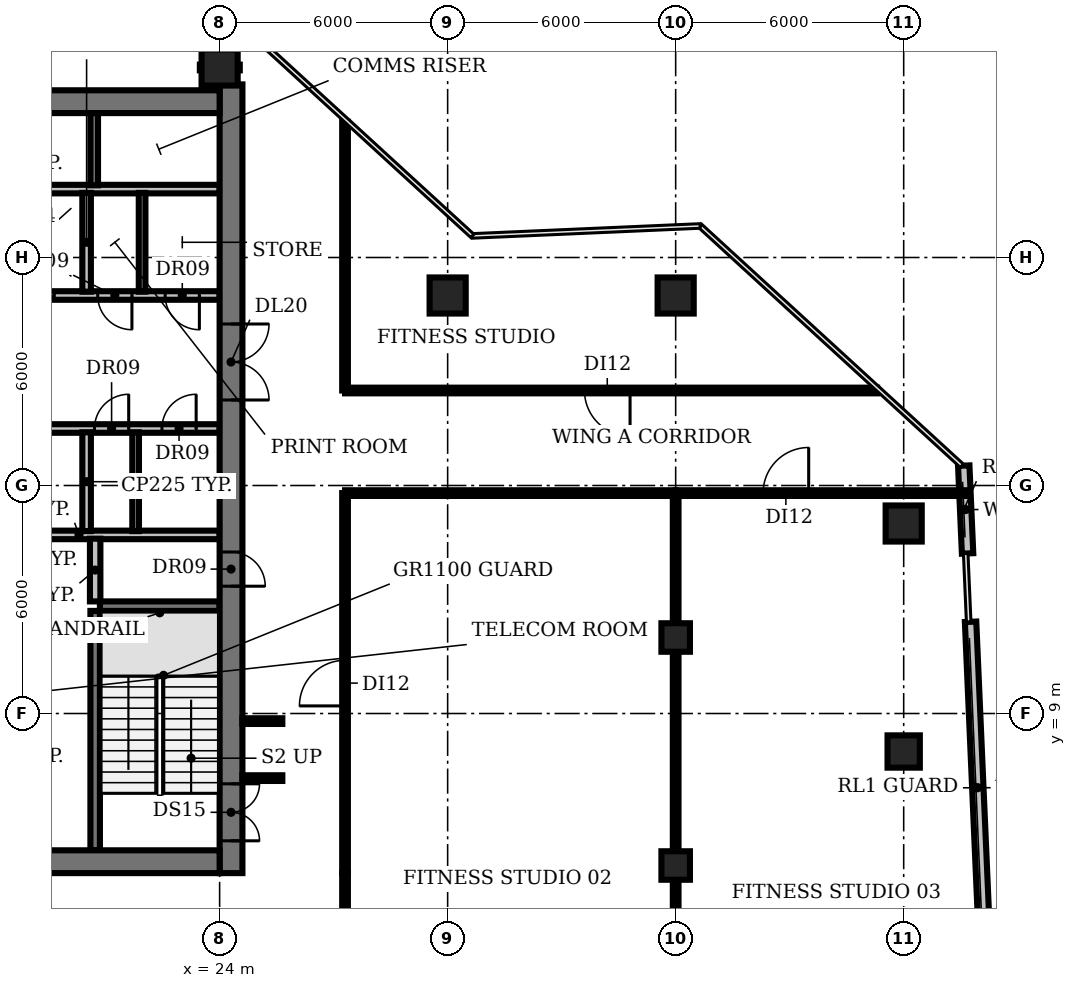
"""IFC4 building model, lengths in metres.
Left out: names, types, materials, properties, quantities, classifications, styles, units other than length and angle.
Written with IfcOpenShell. Run it as: python <this file> out.ifc"""

import sys

from ifc_helpers import new_model, si_unit, direction, frame, frame_2d, origin, origin_2d, place, context, subcontext, project, spatial, rectangle, circle, extrude, element, fill, save


model = new_model("IFC4")
c1 = context("Model", 3, precision=1e-05, world=origin(), true_north=direction((0.0, 1.0)))
c2 = subcontext(c1, "Body", "Model", "MODEL_VIEW")
j1 = project(units=[si_unit("LENGTHUNIT", "METRE"), si_unit("PLANEANGLEUNIT", "RADIAN")], contexts=[c1])
p1 = place(None, origin())
s1 = spatial("IfcSite", under=j1, at=p1, CompositionType="ELEMENT")
p2 = place(p1, origin())
s2 = spatial("IfcBuilding", under=s1, at=p2, CompositionType="ELEMENT")
p3 = place(p2, frame((0.0, 0.0, 180.2)))
s3 = spatial("IfcBuildingStorey", under=s2, at=p3, CompositionType="ELEMENT", Elevation=180.2)
for number, where, z_axis, x_axis in (
    (1, (24.0, 26.0, 0.0), (0.0, 0.0, 1.0), (1.0, 0.0, 0.0)),
    (2, (30.0, 20.0, 0.0), (0.0, 0.0, 1.0), (1.0, 0.0, 0.0)),
):
    element("IfcColumn", number, at=place(p3, frame(where, z_axis=z_axis, x_axis=x_axis)), inside=s3, PredefinedType="COLUMN", context=c2, shape_type="SweptSolid", body=[
        extrude(circle(Radius=0.475, at=origin_2d()), origin(), (0.0, 0.0, 1.0), 3.85),
    ])
for number, where, z_axis, x_axis in (
    (3, (36.0, 5.0, 0.0), (0.0, 0.0, 1.0), (1.0, 0.0, 0.0)),
    (4, (36.0, 11.0, 0.0), (0.0, 0.0, 1.0), (1.0, 0.0, 0.0)),
):
    element("IfcColumn", number, at=place(p3, frame(where, z_axis=z_axis, x_axis=x_axis)), inside=s3, PredefinedType="COLUMN", context=c2, shape_type="SweptSolid", body=[
        extrude(rectangle(XDim=0.75, YDim=0.75, at=origin_2d()), origin(), (0.0, 0.0, 1.0), 3.85),
    ])
p4 = place(p3, frame((36.0, 20.0, 0.0), z_axis=(0.0, 0.0, 1.0), x_axis=(1.0, 0.0, 0.0)))
e5 = element("IfcColumn", 5, at=p4, inside=s3, PredefinedType="COLUMN", context=c2, shape_type="SweptSolid", body=[
    extrude(circle(Radius=0.475, at=origin_2d()), origin(), (0.0, 0.0, 1.0), 3.85),
])
p5 = place(p3, frame((42.0, 8.0, 0.0), z_axis=(0.0, 0.0, 1.0), x_axis=(1.0, 0.0, 0.0)))
e6 = element("IfcColumn", 6, at=p5, inside=s3, PredefinedType="COLUMN", context=c2, shape_type="SweptSolid", body=[
    extrude(rectangle(XDim=0.85, YDim=0.85, at=origin_2d()), origin(), (0.0, 0.0, 1.0), 3.85),
])
p6 = place(p3, frame((42.0, 14.0, 0.0), z_axis=(0.0, 0.0, 1.0), x_axis=(1.0, 0.0, 0.0)))
e7 = element("IfcColumn", 7, at=p6, inside=s3, PredefinedType="COLUMN", context=c2, shape_type="SweptSolid", body=[
    extrude(circle(Radius=0.475, at=origin_2d()), origin(), (0.0, 0.0, 1.0), 3.85),
])
p7 = place(p3, frame((44.141, 2.682, 0.0), z_axis=(0.0, 0.0, 1.0), x_axis=(-0.043632390192, 0.999047653781, 0.0)))
e8 = element("IfcWall", 8, at=p7, inside=s3, PredefinedType="SOLIDWALL", context=c2, shape_type="SweptSolid", body=[
    extrude(rectangle(XDim=8.74, YDim=0.3, at=frame_2d((4.37, 0.0))), origin(), (0.0, 0.0, 1.0), 3.85),
])
p8 = place(p3, frame((43.681, 13.212, 0.0), z_axis=(0.0, 0.0, 1.0), x_axis=(-0.043693705814, 0.999044973999, 0.0)))
e9 = element("IfcWall", 9, at=p8, inside=s3, PredefinedType="SOLIDWALL", context=c2, shape_type="SweptSolid", body=[
    extrude(rectangle(XDim=2.313, YDim=0.3, at=frame_2d((1.157, 0.0))), origin(), (0.0, 0.0, 1.0), 3.85),
])
p9 = place(p3, frame((20.85, 11.825, 0.0), z_axis=(0.0, 0.0, 1.0), x_axis=(1.0, 0.0, 0.0)))
e10 = element("IfcWall", 10, at=p9, inside=s3, PredefinedType="SHEAR", context=c2, shape_type="SweptSolid", body=[
    extrude(rectangle(XDim=3.15, YDim=0.25, at=frame_2d((1.575, 0.0))), origin(), (0.0, 0.0, 1.0), 3.85),
])
p10 = place(p3, frame((16.6, 13.7, 0.0), z_axis=(0.0, 0.0, 1.0), x_axis=(1.0, 0.0, 0.0)))
e11 = element("IfcWall", 11, at=p10, inside=s3, PredefinedType="PARTITIONING", context=c2, shape_type="SweptSolid", body=[
    extrude(rectangle(XDim=7.4, YDim=0.225, at=frame_2d((3.7, 0.0))), origin(), (0.0, 0.0, 1.0), 3.85),
])
p11 = place(p3, frame((9.4, 16.5, 0.0), z_axis=(0.0, 0.0, 1.0), x_axis=(1.0, 0.0, 0.0)))
e12 = element("IfcWall", 12, at=p11, inside=s3, PredefinedType="PARTITIONING", context=c2, shape_type="SweptSolid", body=[
    extrude(rectangle(XDim=14.6, YDim=0.225, at=frame_2d((7.3, 0.0))), origin(), (0.0, 0.0, 1.0), 3.85),
])
p12 = place(p11, frame((1.9, 0.0, 0.0)))
e13 = element("IfcOpeningElement", 13, at=p12, cuts=e12, PredefinedType="OPENING", context=c2, shape_type="SweptSolid", body=[
    extrude(rectangle(XDim=1.0, YDim=2.1, at=frame_2d((0.5, 1.05))), frame((0.0, 0.123, 0.0), z_axis=(0.0, -1.0, 0.0), x_axis=(1.0, 0.0, 0.0)), (0.0, 0.0, 1.0), 0.245),
])
p13 = place(p11, frame((7.475, 0.0, 0.0)))
e14 = element("IfcOpeningElement", 14, at=p13, cuts=e12, PredefinedType="OPENING", context=c2, shape_type="SweptSolid", body=[
    extrude(rectangle(XDim=1.0, YDim=2.1, at=frame_2d((0.5, 1.05))), frame((0.0, 0.123, 0.0), z_axis=(0.0, -1.0, 0.0), x_axis=(1.0, 0.0, 0.0)), (0.0, 0.0, 1.0), 0.245),
])
p14 = place(p11, frame((11.308, 0.0, 0.0)))
e15 = element("IfcOpeningElement", 15, at=p14, cuts=e12, PredefinedType="OPENING", context=c2, shape_type="SweptSolid", body=[
    extrude(rectangle(XDim=0.9, YDim=2.1, at=frame_2d((0.45, 1.05))), frame((0.0, 0.123, 0.0), z_axis=(0.0, -1.0, 0.0), x_axis=(1.0, 0.0, 0.0)), (0.0, 0.0, 1.0), 0.245),
])
p15 = place(p11, frame((13.083, 0.0, 0.0)))
e16 = element("IfcOpeningElement", 16, at=p15, cuts=e12, PredefinedType="OPENING", context=c2, shape_type="SweptSolid", body=[
    extrude(rectangle(XDim=0.9, YDim=2.1, at=frame_2d((0.45, 1.05))), frame((0.0, 0.123, 0.0), z_axis=(0.0, -1.0, 0.0), x_axis=(1.0, 0.0, 0.0)), (0.0, 0.0, 1.0), 0.245),
])
p16 = place(p3, frame((24.0, 20.0, 0.0), z_axis=(0.0, 0.0, 1.0), x_axis=(-1.0, 0.0, 0.0)))
e17 = element("IfcWall", 17, at=p16, inside=s3, PredefinedType="PARTITIONING", context=c2, shape_type="SweptSolid", body=[
    extrude(rectangle(XDim=14.6, YDim=0.225, at=frame_2d((7.3, 0.0))), origin(), (0.0, 0.0, 1.0), 3.85),
])
p17 = place(p16, frame((12.75, 0.0, 0.0)))
e18 = element("IfcOpeningElement", 18, at=p17, cuts=e17, PredefinedType="OPENING", context=c2, shape_type="SweptSolid", body=[
    extrude(rectangle(XDim=1.1, YDim=2.1, at=frame_2d((0.55, 1.05))), frame((0.0, 0.123, 0.0), z_axis=(0.0, -1.0, 0.0), x_axis=(1.0, 0.0, 0.0)), (0.0, 0.0, 1.0), 0.245),
])
p18 = place(p16, frame((9.95, 0.0, 0.0)))
e19 = element("IfcOpeningElement", 19, at=p18, cuts=e17, PredefinedType="OPENING", context=c2, shape_type="SweptSolid", body=[
    extrude(rectangle(XDim=1.1, YDim=2.1, at=frame_2d((0.55, 1.05))), frame((0.0, 0.123, 0.0), z_axis=(0.0, -1.0, 0.0), x_axis=(1.0, 0.0, 0.0)), (0.0, 0.0, 1.0), 0.245),
])
p19 = place(p16, frame((7.15, 0.0, 0.0)))
e20 = element("IfcOpeningElement", 20, at=p19, cuts=e17, PredefinedType="OPENING", context=c2, shape_type="SweptSolid", body=[
    extrude(rectangle(XDim=1.1, YDim=2.1, at=frame_2d((0.55, 1.05))), frame((0.0, 0.123, 0.0), z_axis=(0.0, -1.0, 0.0), x_axis=(1.0, 0.0, 0.0)), (0.0, 0.0, 1.0), 0.245),
])
p20 = place(p16, frame((4.35, 0.0, 0.0)))
e21 = element("IfcOpeningElement", 21, at=p20, cuts=e17, PredefinedType="OPENING", context=c2, shape_type="SweptSolid", body=[
    extrude(rectangle(XDim=1.1, YDim=2.1, at=frame_2d((0.55, 1.05))), frame((0.0, 0.123, 0.0), z_axis=(0.0, -1.0, 0.0), x_axis=(1.0, 0.0, 0.0)), (0.0, 0.0, 1.0), 0.245),
])
p21 = place(p16, frame((2.308, 0.0, 0.0)))
e22 = element("IfcOpeningElement", 22, at=p21, cuts=e17, PredefinedType="OPENING", context=c2, shape_type="SweptSolid", body=[
    extrude(rectangle(XDim=0.9, YDim=2.1, at=frame_2d((0.45, 1.05))), frame((0.0, 0.123, 0.0), z_axis=(0.0, -1.0, 0.0), x_axis=(1.0, 0.0, 0.0)), (0.0, 0.0, 1.0), 0.245),
])
p22 = place(p16, frame((0.532, 0.0, 0.0)))
e23 = element("IfcOpeningElement", 23, at=p22, cuts=e17, PredefinedType="OPENING", context=c2, shape_type="SweptSolid", body=[
    extrude(rectangle(XDim=0.9, YDim=2.1, at=frame_2d((0.45, 1.05))), frame((0.0, 0.123, 0.0), z_axis=(0.0, -1.0, 0.0), x_axis=(1.0, 0.0, 0.0)), (0.0, 0.0, 1.0), 0.245),
])
p23 = place(p3, frame((9.4, 22.8, 0.0), z_axis=(0.0, 0.0, 1.0), x_axis=(1.0, 0.0, 0.0)))
e24 = element("IfcWall", 24, at=p23, inside=s3, PredefinedType="PARTITIONING", context=c2, shape_type="SweptSolid", body=[
    extrude(rectangle(XDim=14.6, YDim=0.225, at=frame_2d((7.3, 0.0))), origin(), (0.0, 0.0, 1.0), 3.85),
])
for number, where, z_axis, x_axis in (
    (25, (20.5, 13.8, 0.0), (0.0, 0.0, 1.0), (0.0, 1.0, 0.0)),
    (26, (20.5, 20.1, 0.0), (0.0, 0.0, 1.0), (0.0, 1.0, 0.0)),
):
    element("IfcWall", number, at=place(p3, frame(where, z_axis=z_axis, x_axis=x_axis)), inside=s3, PredefinedType="PARTITIONING", context=c2, shape_type="SweptSolid", body=[
        extrude(rectangle(XDim=2.6, YDim=0.225, at=frame_2d((1.3, 0.0))), origin(), (0.0, 0.0, 1.0), 3.85),
    ])
p24 = place(p3, frame((20.7, 22.9, 0.0), z_axis=(0.0, 0.0, 1.0), x_axis=(0.0, 1.0, 0.0)))
e27 = element("IfcWall", 27, at=p24, inside=s3, PredefinedType="SHEAR", context=c2, shape_type="SweptSolid", body=[
    extrude(rectangle(XDim=1.9, YDim=0.2, at=frame_2d((0.95, 0.0))), origin(), (0.0, 0.0, 1.0), 3.85),
])
p25 = place(p3, frame((20.725, 5.4, 0.0), z_axis=(0.0, 0.0, 1.0), x_axis=(0.0, 1.0, 0.0)))
e28 = element("IfcWall", 28, at=p25, inside=s3, PredefinedType="SHEAR", context=c2, shape_type="SweptSolid", body=[
    extrude(rectangle(XDim=6.3, YDim=0.25, at=frame_2d((3.15, 0.0))), origin(), (0.0, 0.0, 1.0), 3.85),
])
p26 = place(p3, frame((20.725, 11.95, 0.0), z_axis=(0.0, 0.0, 1.0), x_axis=(0.0, 1.0, 0.0)))
e29 = element("IfcWall", 29, at=p26, inside=s3, PredefinedType="PARTITIONING", context=c2, shape_type="SweptSolid", body=[
    extrude(rectangle(XDim=1.65, YDim=0.275, at=frame_2d((0.825, 0.0))), origin(), (0.0, 0.0, 1.0), 3.85),
])
for number, where, z_axis, x_axis in (
    (30, (21.79, 13.8, 0.0), (0.0, 0.0, 1.0), (0.0, 1.0, 0.0)),
    (31, (21.96, 20.1, 0.0), (0.0, 0.0, 1.0), (0.0, 1.0, 0.0)),
):
    element("IfcWall", number, at=place(p3, frame(where, z_axis=z_axis, x_axis=x_axis)), inside=s3, PredefinedType="PARTITIONING", context=c2, shape_type="SweptSolid", body=[
        extrude(rectangle(XDim=2.6, YDim=0.175, at=frame_2d((1.3, 0.0))), origin(), (0.0, 0.0, 1.0), 3.85),
    ])
p27 = place(p3, frame((24.3, 25.555, 0.0), z_axis=(0.0, 0.0, 1.0), x_axis=(0.0, -1.0, 0.0)))
e32 = element("IfcWall", 32, at=p27, inside=s3, PredefinedType="SHEAR", context=c2, shape_type="SweptSolid", body=[
    extrude(rectangle(XDim=20.755, YDim=0.6, at=frame_2d((10.377, 0.0))), origin(), (0.0, 0.0, 1.0), 3.85),
])
p28 = place(p27, frame((18.405, 0.0, 0.0)))
e33 = element("IfcOpeningElement", 33, at=p28, cuts=e32, PredefinedType="OPENING", context=c2, shape_type="SweptSolid", body=[
    extrude(rectangle(XDim=1.5, YDim=2.1, at=frame_2d((0.75, 1.05))), frame((0.0, 0.31, 0.0), z_axis=(0.0, -1.0, 0.0), x_axis=(1.0, 0.0, 0.0)), (0.0, 0.0, 1.0), 0.62),
])
p29 = place(p27, frame((12.305, 0.0, 0.0)))
e34 = element("IfcOpeningElement", 34, at=p29, cuts=e32, PredefinedType="OPENING", context=c2, shape_type="SweptSolid", body=[
    extrude(rectangle(XDim=0.9, YDim=2.1, at=frame_2d((0.45, 1.05))), frame((0.0, 0.31, 0.0), z_axis=(0.0, -1.0, 0.0), x_axis=(1.0, 0.0, 0.0)), (0.0, 0.0, 1.0), 0.62),
])
p30 = place(p27, frame((6.305, 0.0, 0.0)))
e35 = element("IfcOpeningElement", 35, at=p30, cuts=e32, PredefinedType="OPENING", context=c2, shape_type="SweptSolid", body=[
    extrude(rectangle(XDim=2.0, YDim=2.1, at=frame_2d((1.0, 1.05))), frame((0.0, 0.31, 0.0), z_axis=(0.0, -1.0, 0.0), x_axis=(1.0, 0.0, 0.0)), (0.0, 0.0, 1.0), 0.62),
])
p31 = place(p3, frame((24.0, 5.1, 0.0), z_axis=(0.0, 0.0, 1.0), x_axis=(-1.0, 0.0, 0.0)))
e36 = element("IfcWall", 36, at=p31, inside=s3, PredefinedType="SHEAR", context=c2, shape_type="SweptSolid", body=[
    extrude(rectangle(XDim=18.0, YDim=0.6, at=frame_2d((9.0, 0.0))), origin(), (0.0, 0.0, 1.0), 3.85),
])
p32 = place(p31, frame((13.0, 0.0, 0.0)))
e37 = element("IfcOpeningElement", 37, at=p32, cuts=e36, PredefinedType="OPENING", context=c2, shape_type="SweptSolid", body=[
    extrude(rectangle(XDim=1.2, YDim=2.1, at=frame_2d((0.6, 1.05))), frame((0.0, 0.31, 0.0), z_axis=(0.0, -1.0, 0.0), x_axis=(1.0, 0.0, 0.0)), (0.0, 0.0, 1.0), 0.62),
])
p33 = place(p31, frame((4.9, 0.0, 0.0)))
e38 = element("IfcOpeningElement", 38, at=p33, cuts=e36, PredefinedType="OPENING", context=c2, shape_type="SweptSolid", body=[
    extrude(rectangle(XDim=1.0, YDim=2.1, at=frame_2d((0.5, 1.05))), frame((0.0, 0.31, 0.0), z_axis=(0.0, -1.0, 0.0), x_axis=(1.0, 0.0, 0.0)), (0.0, 0.0, 1.0), 0.62),
])
p34 = place(p3, frame((6.0, 25.1, 0.0), z_axis=(0.0, 0.0, 1.0), x_axis=(1.0, 0.0, 0.0)))
e39 = element("IfcWall", 39, at=p34, inside=s3, PredefinedType="SHEAR", context=c2, shape_type="SweptSolid", body=[
    extrude(rectangle(XDim=18.0, YDim=0.6, at=frame_2d((9.0, 0.0))), origin(), (0.0, 0.0, 1.0), 3.85),
])
p35 = place(p3, frame((23.48, 26.0, 0.0), z_axis=(0.0, 0.0, 1.0), x_axis=(1.0, 0.0, 0.0)))
e40 = element("IfcWall", 40, at=p35, inside=s3, PredefinedType="PARTITIONING", context=c2, shape_type="SweptSolid", body=[
    extrude(rectangle(XDim=1.05, YDim=0.15, at=frame_2d((0.525, 0.0))), origin(), (0.0, 0.0, 1.0), 2.88),
])
for number, where, z_axis, x_axis in (
    (41, (24.6, 7.3, 0.0), (0.0, 0.0, 1.0), (1.0, 0.0, 0.0)),
    (42, (24.6, 8.8, 0.0), (0.0, 0.0, 1.0), (1.0, 0.0, 0.0)),
):
    element("IfcWall", number, at=place(p3, frame(where, z_axis=z_axis, x_axis=x_axis)), inside=s3, PredefinedType="PARTITIONING", context=c2, shape_type="SweptSolid", body=[
        extrude(rectangle(XDim=1.05, YDim=0.15, at=frame_2d((0.525, 0.0))), origin(), (0.0, 0.0, 1.0), 2.88),
    ])
p36 = place(p3, frame((27.3, 0.9, 0.0), z_axis=(0.0, 0.0, 1.0), x_axis=(0.0, 1.0, 0.0)))
e43 = element("IfcWall", 43, at=p36, inside=s3, PredefinedType="PARTITIONING", context=c2, shape_type="SweptSolid", body=[
    extrude(rectangle(XDim=3.9, YDim=0.15, at=frame_2d((1.95, 0.0))), origin(), (0.0, 0.0, 1.0), 2.88),
])
p37 = place(p3, frame((27.3, 4.8, 0.0), z_axis=(0.0, 0.0, 1.0), x_axis=(0.0, 1.0, 0.0)))
e44 = element("IfcWall", 44, at=p37, inside=s3, PredefinedType="PARTITIONING", context=c2, shape_type="SweptSolid", body=[
    extrude(rectangle(XDim=10.0, YDim=0.15, at=frame_2d((5.0, 0.0))), origin(), (0.0, 0.0, 1.0), 2.88),
])
p38 = place(p37, frame((4.4, 0.0, 0.0)))
e45 = element("IfcOpeningElement", 45, at=p38, cuts=e44, PredefinedType="OPENING", context=c2, shape_type="SweptSolid", body=[
    extrude(rectangle(XDim=1.2, YDim=2.1, at=frame_2d((0.6, 1.05))), frame((0.0, 0.085, 0.0), z_axis=(0.0, -1.0, 0.0), x_axis=(1.0, 0.0, 0.0)), (0.0, 0.0, 1.0), 0.17),
])
p39 = place(p3, frame((27.3, 14.8, 0.0), z_axis=(0.0, 0.0, 1.0), x_axis=(1.0, 0.0, 0.0)))
e46 = element("IfcWall", 46, at=p39, inside=s3, PredefinedType="PARTITIONING", context=c2, shape_type="SweptSolid", body=[
    extrude(rectangle(XDim=8.7, YDim=0.15, at=frame_2d((4.35, 0.0))), origin(), (0.0, 0.0, 1.0), 2.88),
])
p40 = place(p3, frame((27.3, 17.5, 0.0), z_axis=(0.0, 0.0, 1.0), x_axis=(0.0, 1.0, 0.0)))
e47 = element("IfcWall", 47, at=p40, inside=s3, PredefinedType="PARTITIONING", context=c2, shape_type="SweptSolid", body=[
    extrude(rectangle(XDim=7.07, YDim=0.15, at=frame_2d((3.535, 0.0))), origin(), (0.0, 0.0, 1.0), 2.88),
])
p41 = place(p3, frame((36.0, -4.98, 0.0), z_axis=(0.0, 0.0, 1.0), x_axis=(0.0, 1.0, 0.0)))
e48 = element("IfcWall", 48, at=p41, inside=s3, PredefinedType="PARTITIONING", context=c2, shape_type="SweptSolid", body=[
    extrude(rectangle(XDim=19.78, YDim=0.15, at=frame_2d((9.89, 0.0))), origin(), (0.0, 0.0, 1.0), 2.88),
])
p42 = place(p3, frame((36.0, 14.8, 0.0), z_axis=(0.0, 0.0, 1.0), x_axis=(1.0, 0.0, 0.0)))
e49 = element("IfcWall", 49, at=p42, inside=s3, PredefinedType="PARTITIONING", context=c2, shape_type="SweptSolid", body=[
    extrude(rectangle(XDim=7.622, YDim=0.15, at=frame_2d((3.811, 0.0))), origin(), (0.0, 0.0, 1.0), 2.88),
])
p43 = place(p42, frame((2.3, 0.0, 0.0)))
e50 = element("IfcOpeningElement", 50, at=p43, cuts=e49, PredefinedType="OPENING", context=c2, shape_type="SweptSolid", body=[
    extrude(rectangle(XDim=1.2, YDim=2.1, at=frame_2d((0.6, 1.05))), frame((0.0, 0.085, 0.0), z_axis=(0.0, -1.0, 0.0), x_axis=(1.0, 0.0, 0.0)), (0.0, 0.0, 1.0), 0.17),
])
p44 = place(p3, frame((41.3, 17.5, 0.0), z_axis=(0.0, 0.0, 1.0), x_axis=(-1.0, 0.0, 0.0)))
e51 = element("IfcWall", 51, at=p44, inside=s3, PredefinedType="PARTITIONING", context=c2, shape_type="SweptSolid", body=[
    extrude(rectangle(XDim=14.0, YDim=0.15, at=frame_2d((7.0, 0.0))), origin(), (0.0, 0.0, 1.0), 2.88),
])
p45 = place(p44, frame((6.5, 0.0, 0.0)))
e52 = element("IfcOpeningElement", 52, at=p45, cuts=e51, PredefinedType="OPENING", context=c2, shape_type="SweptSolid", body=[
    extrude(rectangle(XDim=1.2, YDim=2.1, at=frame_2d((0.6, 1.05))), frame((0.0, 0.085, 0.0), z_axis=(0.0, -1.0, 0.0), x_axis=(1.0, 0.0, 0.0)), (0.0, 0.0, 1.0), 0.17),
])
p46 = place(p14, origin())
e53 = element("IfcDoor", 53, at=p46, inside=s3, OperationType="SINGLE_SWING_RIGHT", PredefinedType="DOOR", context=c2, shape_type="SweptSolid", body=[
    extrude(rectangle(XDim=0.9, YDim=2.1, at=frame_2d((0.45, 1.05))), frame((0.0, 0.025, 0.0), z_axis=(0.0, -1.0, 0.0), x_axis=(1.0, 0.0, 0.0)), (0.0, 0.0, 1.0), 0.05),
])
fill(e15, e53)
p47 = place(p15, origin())
e54 = element("IfcDoor", 54, at=p47, inside=s3, OperationType="SINGLE_SWING_RIGHT", PredefinedType="DOOR", context=c2, shape_type="SweptSolid", body=[
    extrude(rectangle(XDim=0.9, YDim=2.1, at=frame_2d((0.45, 1.05))), frame((0.0, 0.025, 0.0), z_axis=(0.0, -1.0, 0.0), x_axis=(1.0, 0.0, 0.0)), (0.0, 0.0, 1.0), 0.05),
])
fill(e16, e54)
p48 = place(p20, origin())
e55 = element("IfcDoor", 55, at=p48, inside=s3, OperationType="DOUBLE_DOOR_SLIDING", PredefinedType="DOOR", context=c2, shape_type="SweptSolid", body=[
    extrude(rectangle(XDim=1.1, YDim=2.1, at=frame_2d((0.55, 1.05))), frame((0.0, 0.025, 0.0), z_axis=(0.0, -1.0, 0.0), x_axis=(1.0, 0.0, 0.0)), (0.0, 0.0, 1.0), 0.05),
])
fill(e21, e55)
p49 = place(p21, origin())
e56 = element("IfcDoor", 56, at=p49, inside=s3, OperationType="SINGLE_SWING_LEFT", PredefinedType="DOOR", context=c2, shape_type="SweptSolid", body=[
    extrude(rectangle(XDim=0.9, YDim=2.1, at=frame_2d((0.45, 1.05))), frame((0.0, 0.025, 0.0), z_axis=(0.0, -1.0, 0.0), x_axis=(1.0, 0.0, 0.0)), (0.0, 0.0, 1.0), 0.05),
])
fill(e22, e56)
p50 = place(p22, origin())
e57 = element("IfcDoor", 57, at=p50, inside=s3, OperationType="SINGLE_SWING_LEFT", PredefinedType="DOOR", context=c2, shape_type="SweptSolid", body=[
    extrude(rectangle(XDim=0.9, YDim=2.1, at=frame_2d((0.45, 1.05))), frame((0.0, 0.025, 0.0), z_axis=(0.0, -1.0, 0.0), x_axis=(1.0, 0.0, 0.0)), (0.0, 0.0, 1.0), 0.05),
])
fill(e23, e57)
p51 = place(p28, origin())
e58 = element("IfcDoor", 58, at=p51, inside=s3, OperationType="DOUBLE_DOOR_SINGLE_SWING", PredefinedType="DOOR", context=c2, shape_type="SweptSolid", body=[
    extrude(rectangle(XDim=1.5, YDim=2.1, at=frame_2d((0.75, 1.05))), frame((0.0, 0.025, 0.0), z_axis=(0.0, -1.0, 0.0), x_axis=(1.0, 0.0, 0.0)), (0.0, 0.0, 1.0), 0.05),
])
fill(e33, e58)
p52 = place(p29, origin())
e59 = element("IfcDoor", 59, at=p52, inside=s3, OperationType="SINGLE_SWING_RIGHT", PredefinedType="DOOR", context=c2, shape_type="SweptSolid", body=[
    extrude(rectangle(XDim=0.9, YDim=2.1, at=frame_2d((0.45, 1.05))), frame((0.0, -0.24, 0.0), z_axis=(0.0, -1.0, 0.0), x_axis=(1.0, 0.0, 0.0)), (0.0, 0.0, 1.0), 0.05),
])
fill(e34, e59)
p53 = place(p30, origin())
e60 = element("IfcDoor", 60, at=p53, inside=s3, OperationType="DOUBLE_DOOR_SINGLE_SWING", PredefinedType="DOOR", context=c2, shape_type="SweptSolid", body=[
    extrude(rectangle(XDim=2.0, YDim=2.1, at=frame_2d((1.0, 1.05))), frame((0.0, 0.025, 0.0), z_axis=(0.0, -1.0, 0.0), x_axis=(1.0, 0.0, 0.0)), (0.0, 0.0, 1.0), 0.05),
])
fill(e35, e60)
p54 = place(p38, origin())
e61 = element("IfcDoor", 61, at=p54, inside=s3, OperationType="SINGLE_SWING_LEFT", PredefinedType="DOOR", context=c2, shape_type="SweptSolid", body=[
    extrude(rectangle(XDim=1.2, YDim=2.1, at=frame_2d((0.6, 1.05))), frame((0.0, 0.025, 0.0), z_axis=(0.0, -1.0, 0.0), x_axis=(1.0, 0.0, 0.0)), (0.0, 0.0, 1.0), 0.05),
])
fill(e45, e61)
p55 = place(p43, origin())
e62 = element("IfcDoor", 62, at=p55, inside=s3, OperationType="SINGLE_SWING_RIGHT", PredefinedType="DOOR", context=c2, shape_type="SweptSolid", body=[
    extrude(rectangle(XDim=1.2, YDim=2.1, at=frame_2d((0.6, 1.05))), frame((0.0, 0.025, 0.0), z_axis=(0.0, -1.0, 0.0), x_axis=(1.0, 0.0, 0.0)), (0.0, 0.0, 1.0), 0.05),
])
fill(e50, e62)
p56 = place(p45, origin())
e63 = element("IfcDoor", 63, at=p56, inside=s3, OperationType="SINGLE_SWING_LEFT", PredefinedType="DOOR", context=c2, shape_type="SweptSolid", body=[
    extrude(rectangle(XDim=1.2, YDim=2.1, at=frame_2d((0.6, 1.05))), frame((0.0, 0.025, 0.0), z_axis=(0.0, -1.0, 0.0), x_axis=(1.0, 0.0, 0.0)), (0.0, 0.0, 1.0), 0.05),
])
fill(e52, e63)
save(model, sys.argv[1])
